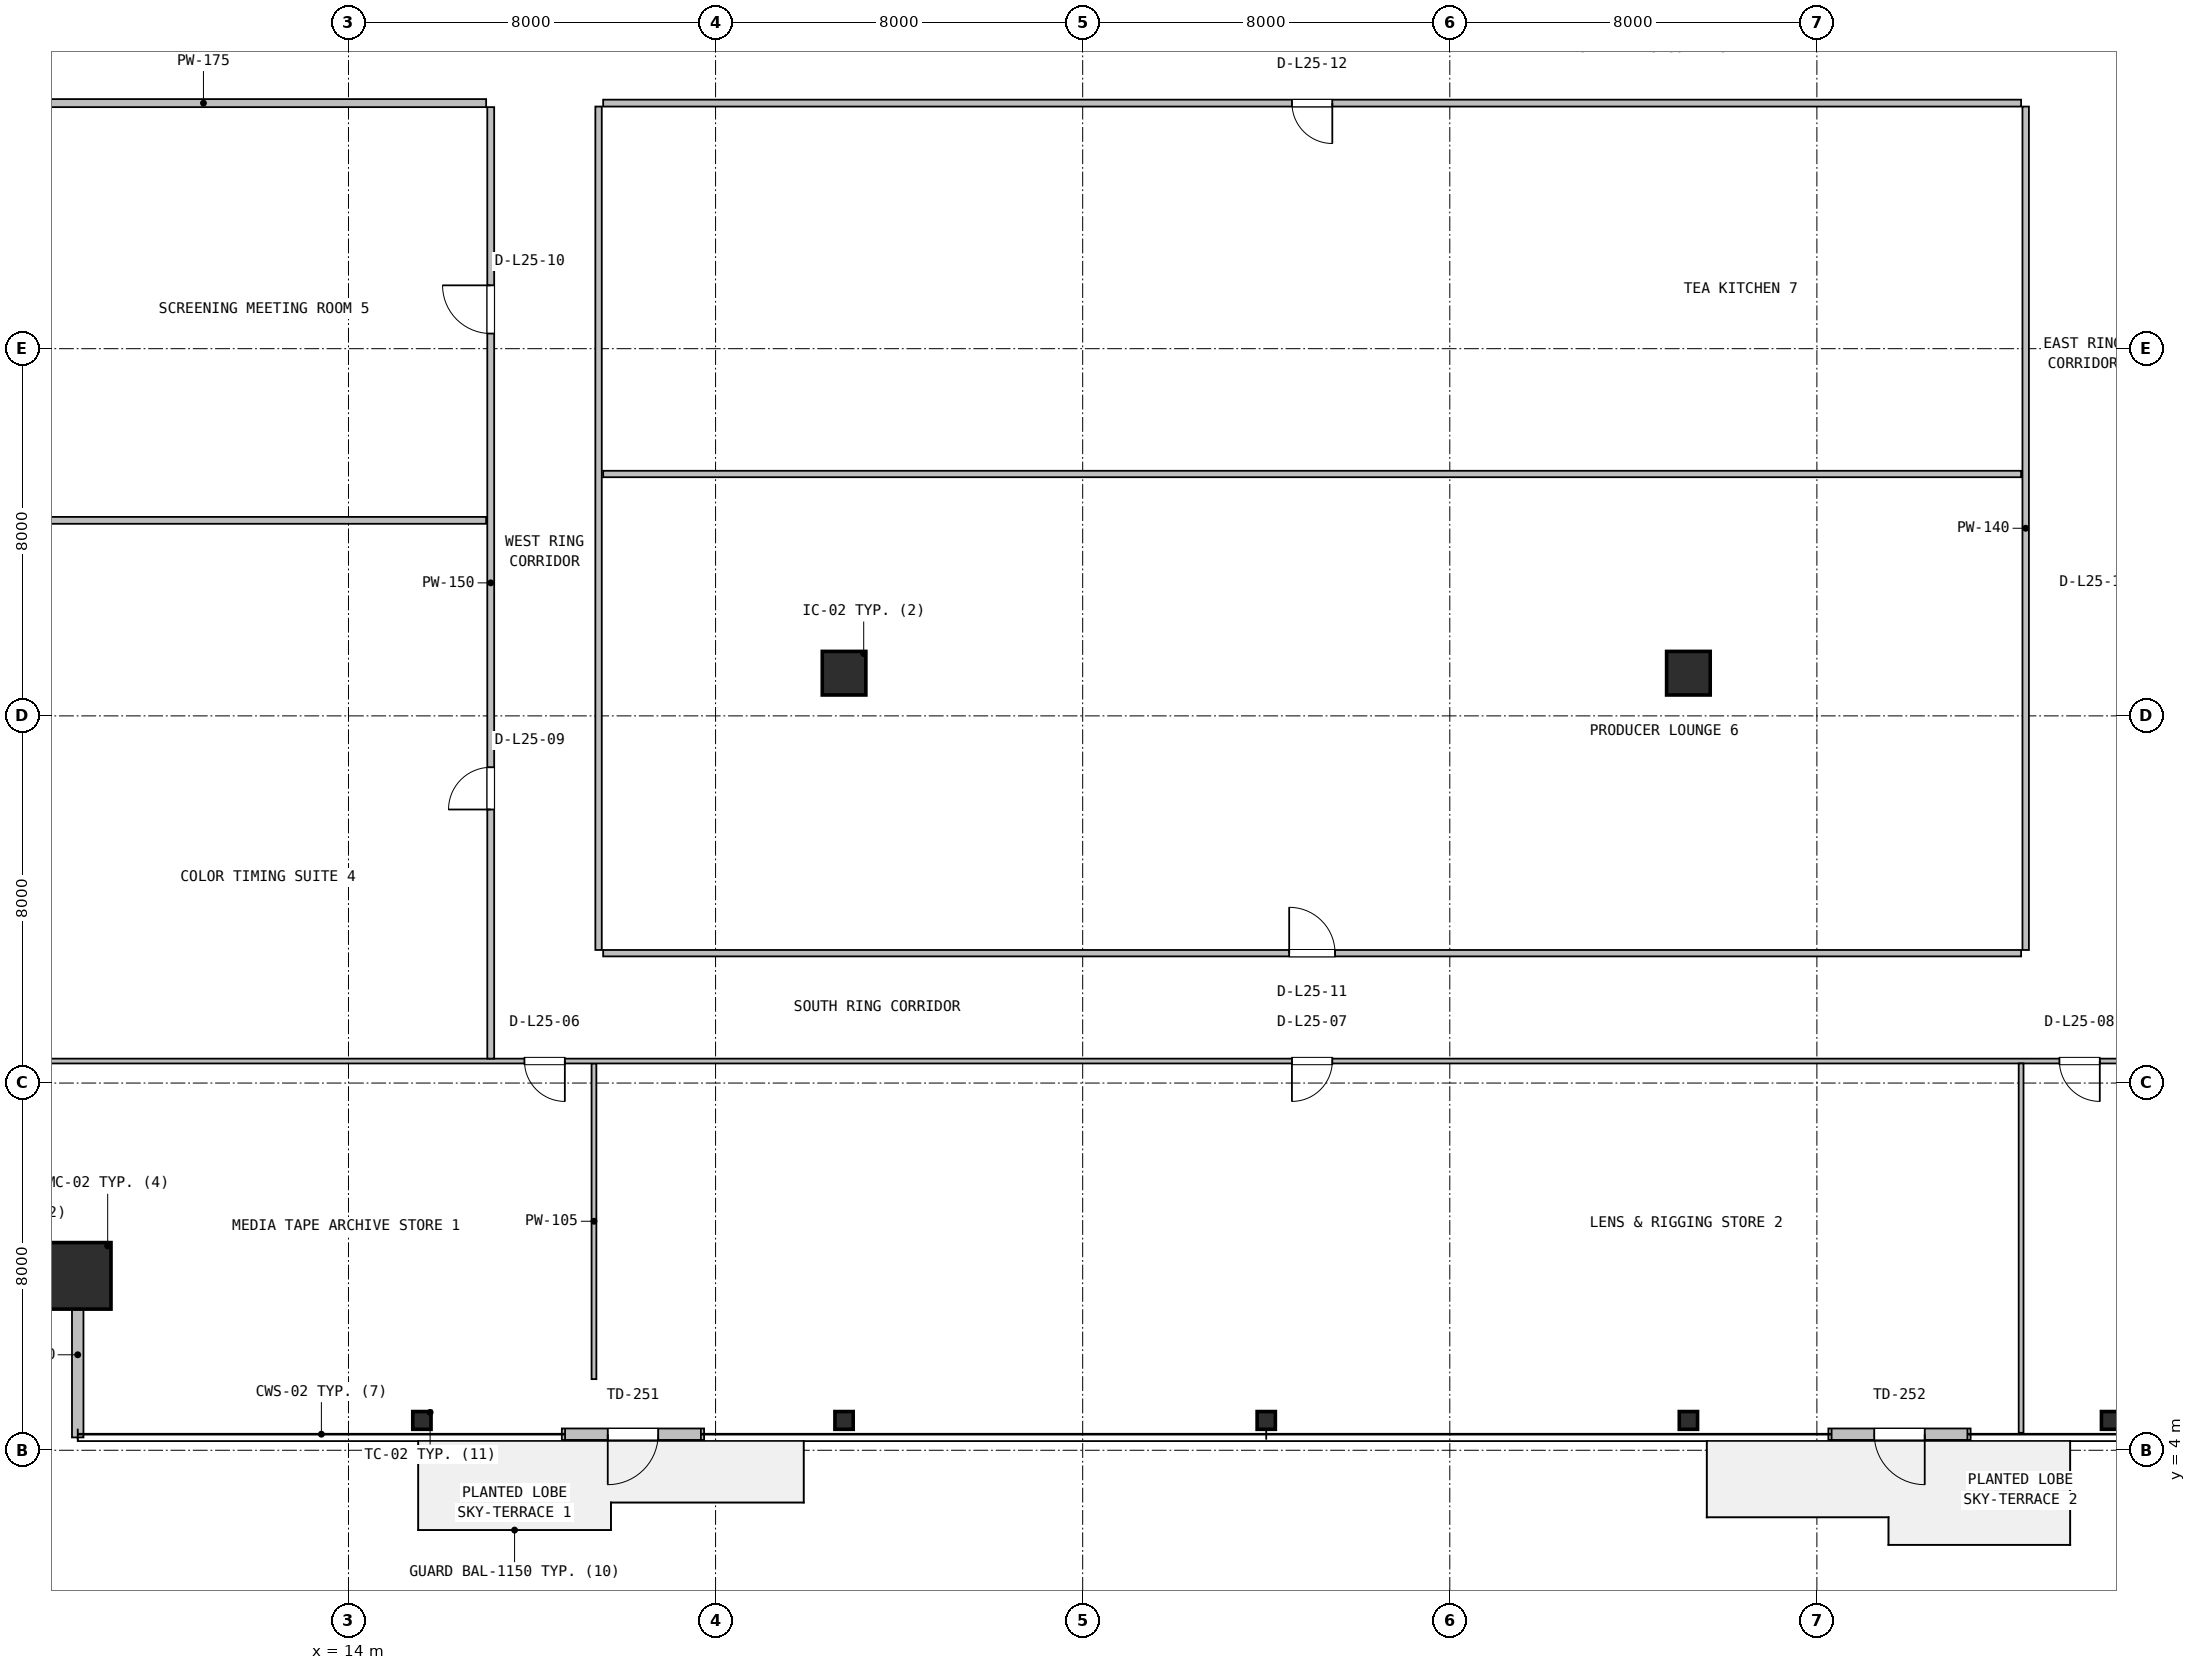
"""IFC4 building model, lengths in metres.
Left out: names, types, materials, properties, quantities, classifications, styles, units other than length and angle.
Written with IfcOpenShell. Run it as: python <this file> out.ifc"""

import sys

from ifc_helpers import new_model, si_unit, direction, frame, frame_2d, origin, origin_2d, place, context, subcontext, project, spatial, rectangle, hollow_rectangle, i_section, extrude, source, transform, mapped, element, fill, save


model = new_model("IFC4")
c1 = context("Model", 3, precision=1e-05, world=origin(), true_north=direction((0.0, 1.0)))
c2 = subcontext(c1, "Body", "Model", "MODEL_VIEW")
j1 = project(units=[si_unit("LENGTHUNIT", "METRE"), si_unit("PLANEANGLEUNIT", "RADIAN")], contexts=[c1])
p1 = place(None, origin())
s1 = spatial("IfcSite", under=j1, at=p1, CompositionType="ELEMENT")
p2 = place(p1, origin())
s2 = spatial("IfcBuilding", under=s1, at=p2, CompositionType="ELEMENT")
p3 = place(p2, frame((0.0, 0.0, 106.8)))
s3 = spatial("IfcBuildingStorey", under=s2, at=p3, CompositionType="ELEMENT", Elevation=106.8)
m1 = source(origin(), c2, "Body", "SweptSolid", [
    extrude(hollow_rectangle(XDim=1.45, YDim=1.45, WallThickness=0.055, at=origin_2d()), origin(), (0.0, 0.0, 1.0), 3.8),
])
p4 = place(p3, frame((8.1, 7.8, 0.0), z_axis=(0.0, 0.0, 1.0), x_axis=(1.0, 0.0, 0.0)))
e1 = element("IfcColumn", 1, at=p4, inside=s3, PredefinedType="COLUMN", context=c2, shape_type="MappedRepresentation", body=[
    mapped(m1, transform((0.0, 0.0, 0.0), x_axis=(1.0, 0.0, 0.0), y_axis=(0.0, 1.0, 0.0), z_axis=(0.0, 0.0, 1.0), scale=1.0)),
])
m2 = source(origin(), c2, "Body", "SweptSolid", [
    extrude(i_section(OverallWidth=0.398, OverallDepth=0.387, WebThickness=0.021, FlangeThickness=0.033, FilletRadius=0.018, at=origin_2d()), origin(), (0.0, 0.0, 1.0), 3.8),
])
for number, where, z_axis, x_axis in (
    (2, (15.6, 4.65, 0.0), (0.0, 0.0, 1.0), (1.0, 0.0, 0.0)),
    (3, (24.8, 4.65, 0.0), (0.0, 0.0, 1.0), (1.0, 0.0, 0.0)),
    (4, (34.0, 4.65, 0.0), (0.0, 0.0, 1.0), (1.0, 0.0, 0.0)),
    (5, (43.2, 4.65, 0.0), (0.0, 0.0, 1.0), (1.0, 0.0, 0.0)),
    (6, (52.4, 4.65, 0.0), (0.0, 0.0, 1.0), (1.0, 0.0, 0.0)),
):
    element("IfcColumn", number, at=place(p3, frame(where, z_axis=z_axis, x_axis=x_axis)), inside=s3, PredefinedType="COLUMN", context=c2, shape_type="MappedRepresentation", body=[
        mapped(m2, transform((0.0, 0.0, 0.0), x_axis=(1.0, 0.0, 0.0), y_axis=(0.0, 1.0, 0.0), z_axis=(0.0, 0.0, 1.0), scale=1.0)),
    ])
m3 = source(origin(), c2, "Body", "SweptSolid", [
    extrude(rectangle(XDim=0.95, YDim=0.95, at=origin_2d()), origin(), (0.0, 0.0, 1.0), 3.8),
])
for number, where, z_axis, x_axis in (
    (7, (24.8, 20.93, 0.0), (0.0, 0.0, 1.0), (1.0, 0.0, 0.0)),
    (8, (43.2, 20.93, 0.0), (0.0, 0.0, 1.0), (1.0, 0.0, 0.0)),
):
    element("IfcColumn", number, at=place(p3, frame(where, z_axis=z_axis, x_axis=x_axis)), inside=s3, PredefinedType="COLUMN", context=c2, shape_type="MappedRepresentation", body=[
        mapped(m3, transform((0.0, 0.0, 0.0), x_axis=(1.0, 0.0, 0.0), y_axis=(0.0, 1.0, 0.0), z_axis=(0.0, 0.0, 1.0), scale=1.0)),
    ])
p5 = place(p3, frame((18.65, 4.35, 0.0), z_axis=(0.0, 0.0, 1.0), x_axis=(1.0, 0.0, 0.0)))
e9 = element("IfcWall", 9, at=p5, inside=s3, PredefinedType="SOLIDWALL", context=c2, shape_type="SweptSolid", body=[
    extrude(rectangle(XDim=3.1, YDim=0.25, at=frame_2d((1.55, 0.0))), origin(), (0.0, 0.0, 1.0), 3.53),
])
p6 = place(p5, frame((1.0, 0.0, 0.0)))
e10 = element("IfcOpeningElement", 10, at=p6, cuts=e9, PredefinedType="OPENING", context=c2, shape_type="SweptSolid", body=[
    extrude(rectangle(XDim=1.1, YDim=2.15, at=frame_2d((0.55, 1.075))), frame((0.0, 0.135, 0.0), z_axis=(0.0, -1.0, 0.0), x_axis=(1.0, 0.0, 0.0)), (0.0, 0.0, 1.0), 0.27),
])
p7 = place(p3, frame((46.25, 4.35, 0.0), z_axis=(0.0, 0.0, 1.0), x_axis=(1.0, 0.0, 0.0)))
e11 = element("IfcWall", 11, at=p7, inside=s3, PredefinedType="SOLIDWALL", context=c2, shape_type="SweptSolid", body=[
    extrude(rectangle(XDim=3.1, YDim=0.25, at=frame_2d((1.55, 0.0))), origin(), (0.0, 0.0, 1.0), 3.53),
])
p8 = place(p7, frame((1.0, 0.0, 0.0)))
e12 = element("IfcOpeningElement", 12, at=p8, cuts=e11, PredefinedType="OPENING", context=c2, shape_type="SweptSolid", body=[
    extrude(rectangle(XDim=1.1, YDim=2.15, at=frame_2d((0.55, 1.075))), frame((0.0, 0.135, 0.0), z_axis=(0.0, -1.0, 0.0), x_axis=(1.0, 0.0, 0.0)), (0.0, 0.0, 1.0), 0.27),
])
p9 = place(p3, frame((8.1, 4.28, 0.0), z_axis=(0.0, 0.0, 1.0), x_axis=(0.0, 1.0, 0.0)))
e13 = element("IfcWall", 13, at=p9, inside=s3, PredefinedType="SOLIDWALL", context=c2, shape_type="SweptSolid", body=[
    extrude(rectangle(XDim=3.6, YDim=0.25, at=frame_2d((1.8, 0.0))), origin(), (0.0, 0.0, 1.0), 3.108),
])
p10 = place(p3, frame((19.35, 5.55, 0.0), z_axis=(0.0, 0.0, 1.0), x_axis=(0.0, 1.0, 0.0)))
e14 = element("IfcWall", 14, at=p10, inside=s3, PredefinedType="PARTITIONING", context=c2, shape_type="SweptSolid", body=[
    extrude(rectangle(XDim=6.878, YDim=0.105, at=frame_2d((3.439, 0.0))), origin(), (0.0, 0.0, 1.0), 3.222),
])
p11 = place(p3, frame((4.68, 12.48, 0.0), z_axis=(0.0, 0.0, 1.0), x_axis=(1.0, 0.0, 0.0)))
e15 = element("IfcWall", 15, at=p11, inside=s3, PredefinedType="PARTITIONING", context=c2, shape_type="SweptSolid", body=[
    extrude(rectangle(XDim=58.64, YDim=0.105, at=frame_2d((29.32, 0.0))), origin(), (0.0, 0.0, 1.0), 2.83),
])
p12 = place(p11, frame((13.155, 0.0, 0.0)))
e16 = element("IfcOpeningElement", 16, at=p12, cuts=e15, PredefinedType="OPENING", context=c2, shape_type="SweptSolid", body=[
    extrude(rectangle(XDim=0.88, YDim=2.06, at=frame_2d((0.44, 1.03))), frame((0.0, 0.062, 0.0), z_axis=(0.0, -1.0, 0.0), x_axis=(1.0, 0.0, 0.0)), (0.0, 0.0, 1.0), 0.125),
])
p13 = place(p11, frame((29.88, 0.0, 0.0)))
e17 = element("IfcOpeningElement", 17, at=p13, cuts=e15, PredefinedType="OPENING", context=c2, shape_type="SweptSolid", body=[
    extrude(rectangle(XDim=0.88, YDim=2.06, at=frame_2d((0.44, 1.03))), frame((0.0, 0.062, 0.0), z_axis=(0.0, -1.0, 0.0), x_axis=(1.0, 0.0, 0.0)), (0.0, 0.0, 1.0), 0.125),
])
p14 = place(p11, frame((46.605, 0.0, 0.0)))
e18 = element("IfcOpeningElement", 18, at=p14, cuts=e15, PredefinedType="OPENING", context=c2, shape_type="SweptSolid", body=[
    extrude(rectangle(XDim=0.88, YDim=2.06, at=frame_2d((0.44, 1.03))), frame((0.0, 0.062, 0.0), z_axis=(0.0, -1.0, 0.0), x_axis=(1.0, 0.0, 0.0)), (0.0, 0.0, 1.0), 0.125),
])
p15 = place(p3, frame((50.45, 4.38, 0.0), z_axis=(0.0, 0.0, 1.0), x_axis=(0.0, 1.0, 0.0)))
e19 = element("IfcWall", 19, at=p15, inside=s3, PredefinedType="PARTITIONING", context=c2, shape_type="SweptSolid", body=[
    extrude(rectangle(XDim=8.048, YDim=0.105, at=frame_2d((4.024, 0.0))), origin(), (0.0, 0.0, 1.0), 3.108),
])
p16 = place(p3, frame((17.1, 12.533, 0.0), z_axis=(0.0, 0.0, 1.0), x_axis=(0.0, 1.0, 0.0)))
e20 = element("IfcWall", 20, at=p16, inside=s3, PredefinedType="PARTITIONING", context=c2, shape_type="SweptSolid", body=[
    extrude(rectangle(XDim=20.73, YDim=0.15, at=frame_2d((10.365, 0.0))), origin(), (0.0, 0.0, 1.0), 3.222),
])
p17 = place(p16, frame((5.427, 0.0, 0.0)))
e21 = element("IfcOpeningElement", 21, at=p17, cuts=e20, PredefinedType="OPENING", context=c2, shape_type="SweptSolid", body=[
    extrude(rectangle(XDim=0.92, YDim=2.08, at=frame_2d((0.46, 1.04))), frame((0.0, 0.085, 0.0), z_axis=(0.0, -1.0, 0.0), x_axis=(1.0, 0.0, 0.0)), (0.0, 0.0, 1.0), 0.17),
])
p18 = place(p16, frame((15.797, 0.0, 0.0)))
e22 = element("IfcOpeningElement", 22, at=p18, cuts=e20, PredefinedType="OPENING", context=c2, shape_type="SweptSolid", body=[
    extrude(rectangle(XDim=1.05, YDim=2.1, at=frame_2d((0.525, 1.05))), frame((0.0, 0.085, 0.0), z_axis=(0.0, -1.0, 0.0), x_axis=(1.0, 0.0, 0.0)), (0.0, 0.0, 1.0), 0.17),
])
p19 = place(p3, frame((4.68, 24.26, 0.0), z_axis=(0.0, 0.0, 1.0), x_axis=(1.0, 0.0, 0.0)))
e23 = element("IfcWall", 23, at=p19, inside=s3, PredefinedType="PARTITIONING", context=c2, shape_type="SweptSolid", body=[
    extrude(rectangle(XDim=12.32, YDim=0.15, at=frame_2d((6.16, 0.0))), origin(), (0.0, 0.0, 1.0), 3.108),
])
p20 = place(p3, frame((4.68, 33.35, 0.0), z_axis=(0.0, 0.0, 1.0), x_axis=(1.0, 0.0, 0.0)))
e24 = element("IfcWall", 24, at=p20, inside=s3, PredefinedType="PARTITIONING", context=c2, shape_type="SweptSolid", body=[
    extrude(rectangle(XDim=12.32, YDim=0.175, at=frame_2d((6.16, 0.0))), origin(), (0.0, 0.0, 1.0), 3.108),
])
p21 = place(p3, frame((19.55, 14.83, 0.0), z_axis=(0.0, 0.0, 1.0), x_axis=(1.0, 0.0, 0.0)))
e25 = element("IfcWall", 25, at=p21, inside=s3, PredefinedType="PARTITIONING", context=c2, shape_type="SweptSolid", body=[
    extrude(rectangle(XDim=30.9, YDim=0.14, at=frame_2d((15.45, 0.0))), origin(), (0.0, 0.0, 1.0), 2.83),
])
p22 = place(p21, frame((14.95, 0.0, 0.0)))
e26 = element("IfcOpeningElement", 26, at=p22, cuts=e25, PredefinedType="OPENING", context=c2, shape_type="SweptSolid", body=[
    extrude(rectangle(XDim=1.0, YDim=2.1, at=frame_2d((0.5, 1.05))), frame((0.0, 0.08, 0.0), z_axis=(0.0, -1.0, 0.0), x_axis=(1.0, 0.0, 0.0)), (0.0, 0.0, 1.0), 0.16),
])
p23 = place(p3, frame((50.55, 14.9, 0.0), z_axis=(0.0, 0.0, 1.0), x_axis=(0.0, 1.0, 0.0)))
e27 = element("IfcWall", 27, at=p23, inside=s3, PredefinedType="PARTITIONING", context=c2, shape_type="SweptSolid", body=[
    extrude(rectangle(XDim=18.375, YDim=0.14, at=frame_2d((9.188, 0.0))), origin(), (0.0, 0.0, 1.0), 3.222),
])
p24 = place(p3, frame((19.55, 25.27, 0.0), z_axis=(0.0, 0.0, 1.0), x_axis=(1.0, 0.0, 0.0)))
e28 = element("IfcWall", 28, at=p24, inside=s3, PredefinedType="PARTITIONING", context=c2, shape_type="SweptSolid", body=[
    extrude(rectangle(XDim=30.9, YDim=0.14, at=frame_2d((15.45, 0.0))), origin(), (0.0, 0.0, 1.0), 2.83),
])
p25 = place(p3, frame((19.45, 14.9, 0.0), z_axis=(0.0, 0.0, 1.0), x_axis=(0.0, 1.0, 0.0)))
e29 = element("IfcWall", 29, at=p25, inside=s3, PredefinedType="PARTITIONING", context=c2, shape_type="SweptSolid", body=[
    extrude(rectangle(XDim=18.375, YDim=0.14, at=frame_2d((9.188, 0.0))), origin(), (0.0, 0.0, 1.0), 3.222),
])
p26 = place(p3, frame((19.55, 33.35, 0.0), z_axis=(0.0, 0.0, 1.0), x_axis=(1.0, 0.0, 0.0)))
e30 = element("IfcWall", 30, at=p26, inside=s3, PredefinedType="PARTITIONING", context=c2, shape_type="SweptSolid", body=[
    extrude(rectangle(XDim=30.9, YDim=0.15, at=frame_2d((15.45, 0.0))), origin(), (0.0, 0.0, 1.0), 2.83),
])
p27 = place(p26, frame((15.01, 0.0, 0.0)))
e31 = element("IfcOpeningElement", 31, at=p27, cuts=e30, PredefinedType="OPENING", context=c2, shape_type="SweptSolid", body=[
    extrude(rectangle(XDim=0.88, YDim=2.06, at=frame_2d((0.44, 1.03))), frame((0.0, 0.085, 0.0), z_axis=(0.0, -1.0, 0.0), x_axis=(1.0, 0.0, 0.0)), (0.0, 0.0, 1.0), 0.17),
])
m4 = source(origin(), c2, "Body", "SweptSolid", [
    extrude(rectangle(XDim=1.1, YDim=2.15, at=frame_2d((0.55, 1.075))), frame((0.0, 0.025, 0.0), z_axis=(0.0, -1.0, 0.0), x_axis=(1.0, 0.0, 0.0)), (0.0, 0.0, 1.0), 0.05),
])
p28 = place(p6, frame((1.1, 0.0, 0.0), z_axis=(0.0, 0.0, 1.0), x_axis=(-1.0, 0.0, 0.0)))
e32 = element("IfcDoor", 32, at=p28, inside=s3, OperationType="SINGLE_SWING_LEFT", PredefinedType="DOOR", context=c2, shape_type="MappedRepresentation", body=[
    mapped(m4, transform((0.0, 0.0, 0.0), x_axis=(1.0, 0.0, 0.0), y_axis=(0.0, 1.0, 0.0), z_axis=(0.0, 0.0, 1.0), scale=1.0)),
])
fill(e10, e32)
p29 = place(p8, frame((1.1, 0.0, 0.0), z_axis=(0.0, 0.0, 1.0), x_axis=(-1.0, 0.0, 0.0)))
e33 = element("IfcDoor", 33, at=p29, inside=s3, OperationType="SINGLE_SWING_RIGHT", PredefinedType="DOOR", context=c2, shape_type="MappedRepresentation", body=[
    mapped(m4, transform((0.0, 0.0, 0.0), x_axis=(1.0, 0.0, 0.0), y_axis=(0.0, 1.0, 0.0), z_axis=(0.0, 0.0, 1.0), scale=1.0)),
])
fill(e12, e33)
m5 = source(origin(), c2, "Body", "SweptSolid", [
    extrude(rectangle(XDim=0.88, YDim=2.06, at=frame_2d((0.44, 1.03))), frame((0.0, 0.025, 0.0), z_axis=(0.0, -1.0, 0.0), x_axis=(1.0, 0.0, 0.0)), (0.0, 0.0, 1.0), 0.05),
])
p30 = place(p12, frame((0.88, 0.0, 0.0), z_axis=(0.0, 0.0, 1.0), x_axis=(-1.0, 0.0, 0.0)))
e34 = element("IfcDoor", 34, at=p30, inside=s3, OperationType="SINGLE_SWING_RIGHT", PredefinedType="DOOR", context=c2, shape_type="MappedRepresentation", body=[
    mapped(m5, transform((0.0, 0.0, 0.0), x_axis=(1.0, 0.0, 0.0), y_axis=(0.0, 1.0, 0.0), z_axis=(0.0, 0.0, 1.0), scale=1.0)),
])
fill(e16, e34)
p31 = place(p13, frame((0.88, 0.0, 0.0), z_axis=(0.0, 0.0, 1.0), x_axis=(-1.0, 0.0, 0.0)))
e35 = element("IfcDoor", 35, at=p31, inside=s3, OperationType="SINGLE_SWING_LEFT", PredefinedType="DOOR", context=c2, shape_type="MappedRepresentation", body=[
    mapped(m5, transform((0.0, 0.0, 0.0), x_axis=(1.0, 0.0, 0.0), y_axis=(0.0, 1.0, 0.0), z_axis=(0.0, 0.0, 1.0), scale=1.0)),
])
fill(e17, e35)
p32 = place(p14, frame((0.88, 0.0, 0.0), z_axis=(0.0, 0.0, 1.0), x_axis=(-1.0, 0.0, 0.0)))
e36 = element("IfcDoor", 36, at=p32, inside=s3, OperationType="SINGLE_SWING_RIGHT", PredefinedType="DOOR", context=c2, shape_type="MappedRepresentation", body=[
    mapped(m5, transform((0.0, 0.0, 0.0), x_axis=(1.0, 0.0, 0.0), y_axis=(0.0, 1.0, 0.0), z_axis=(0.0, 0.0, 1.0), scale=1.0)),
])
fill(e18, e36)
m6 = source(origin(), c2, "Body", "SweptSolid", [
    extrude(rectangle(XDim=0.92, YDim=2.08, at=frame_2d((0.46, 1.04))), frame((0.0, 0.025, 0.0), z_axis=(0.0, -1.0, 0.0), x_axis=(1.0, 0.0, 0.0)), (0.0, 0.0, 1.0), 0.05),
])
p33 = place(p17, origin())
e37 = element("IfcDoor", 37, at=p33, inside=s3, OperationType="SINGLE_SWING_LEFT", PredefinedType="DOOR", context=c2, shape_type="MappedRepresentation", body=[
    mapped(m6, transform((0.0, 0.0, 0.0), x_axis=(1.0, 0.0, 0.0), y_axis=(0.0, 1.0, 0.0), z_axis=(0.0, 0.0, 1.0), scale=1.0)),
])
fill(e21, e37)
m7 = source(origin(), c2, "Body", "SweptSolid", [
    extrude(rectangle(XDim=1.05, YDim=2.1, at=frame_2d((0.525, 1.05))), frame((0.0, 0.025, 0.0), z_axis=(0.0, -1.0, 0.0), x_axis=(1.0, 0.0, 0.0)), (0.0, 0.0, 1.0), 0.05),
])
p34 = place(p18, origin())
e38 = element("IfcDoor", 38, at=p34, inside=s3, OperationType="SINGLE_SWING_RIGHT", PredefinedType="DOOR", context=c2, shape_type="MappedRepresentation", body=[
    mapped(m7, transform((0.0, 0.0, 0.0), x_axis=(1.0, 0.0, 0.0), y_axis=(0.0, 1.0, 0.0), z_axis=(0.0, 0.0, 1.0), scale=1.0)),
])
fill(e22, e38)
m8 = source(origin(), c2, "Body", "SweptSolid", [
    extrude(rectangle(XDim=1.0, YDim=2.1, at=frame_2d((0.5, 1.05))), frame((0.0, 0.025, 0.0), z_axis=(0.0, -1.0, 0.0), x_axis=(1.0, 0.0, 0.0)), (0.0, 0.0, 1.0), 0.05),
])
p35 = place(p22, origin())
e39 = element("IfcDoor", 39, at=p35, inside=s3, OperationType="SINGLE_SWING_LEFT", PredefinedType="DOOR", context=c2, shape_type="MappedRepresentation", body=[
    mapped(m8, transform((0.0, 0.0, 0.0), x_axis=(1.0, 0.0, 0.0), y_axis=(0.0, 1.0, 0.0), z_axis=(0.0, 0.0, 1.0), scale=1.0)),
])
fill(e26, e39)
p36 = place(p27, frame((0.88, 0.0, 0.0), z_axis=(0.0, 0.0, 1.0), x_axis=(-1.0, 0.0, 0.0)))
e40 = element("IfcDoor", 40, at=p36, inside=s3, OperationType="SINGLE_SWING_RIGHT", PredefinedType="DOOR", context=c2, shape_type="MappedRepresentation", body=[
    mapped(m5, transform((0.0, 0.0, 0.0), x_axis=(1.0, 0.0, 0.0), y_axis=(0.0, 1.0, 0.0), z_axis=(0.0, 0.0, 1.0), scale=1.0)),
])
fill(e31, e40)
save(model, sys.argv[1])
